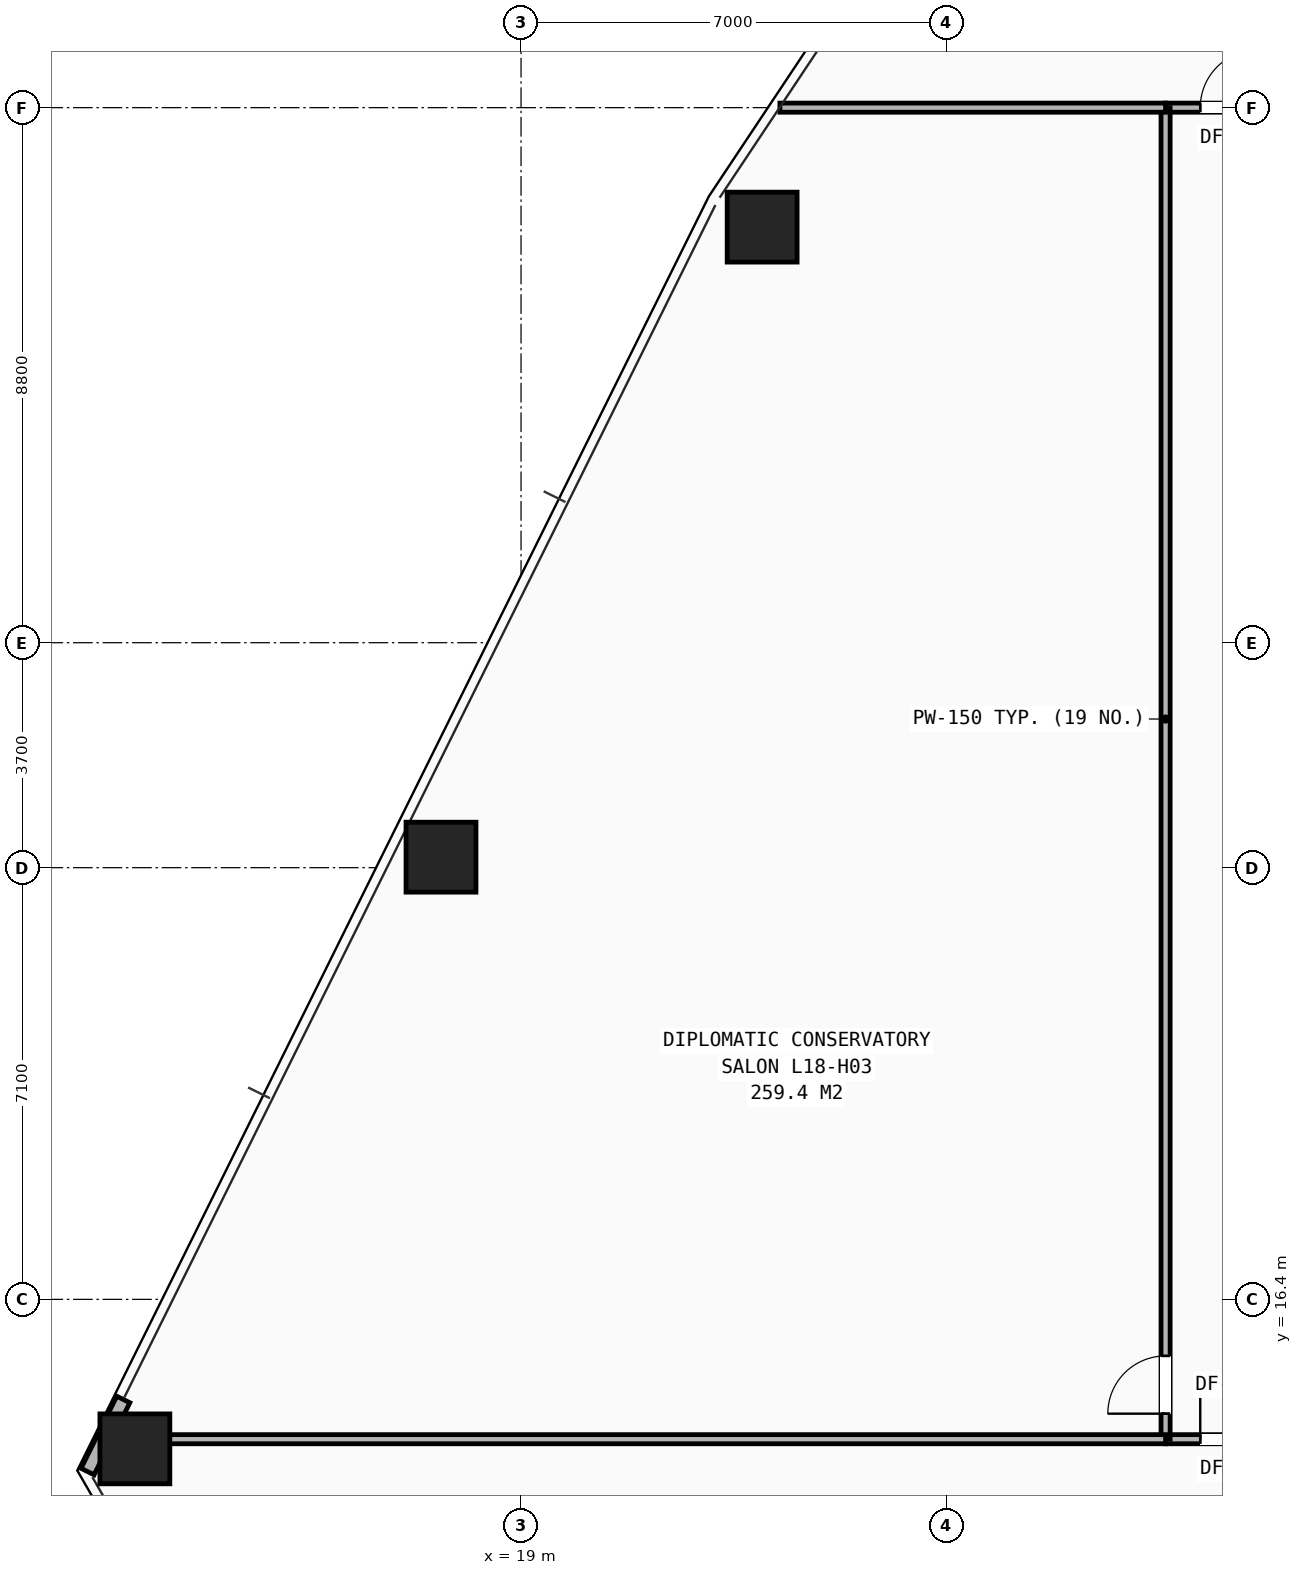
"""IFC4 building model, lengths in metres.
Left out: names, types, materials, properties, quantities, classifications, styles, units other than length and angle.
Written with IfcOpenShell. Run it as: python <this file> out.ifc"""

import sys

from ifc_helpers import new_model, si_unit, direction, frame, frame_2d, origin, origin_2d, place, context, subcontext, project, spatial, rectangle, hollow_rectangle, extrude, element, fill, save


model = new_model("IFC4")
c1 = context("Model", 3, precision=1e-05, world=origin(), true_north=direction((0.0, 1.0)))
c2 = subcontext(c1, "Body", "Model", "MODEL_VIEW")
j1 = project(units=[si_unit("LENGTHUNIT", "METRE"), si_unit("PLANEANGLEUNIT", "RADIAN")], contexts=[c1])
p1 = place(None, origin())
s1 = spatial("IfcSite", under=j1, at=p1, CompositionType="ELEMENT")
p2 = place(p1, origin())
s2 = spatial("IfcBuilding", under=s1, at=p2, CompositionType="ELEMENT")
p3 = place(p2, frame((0.0, 0.0, 65.6)))
s3 = spatial("IfcBuildingStorey", under=s2, at=p3, CompositionType="ELEMENT", Elevation=65.6)
for number, where, z_axis, x_axis in (
    (1, (22.965, 34.035, 0.0), (0.0, 0.0, 1.0), (1.0, 0.0, 0.0)),
    (2, (17.684, 23.673, 0.0), (0.0, 0.0, 1.0), (1.0, 0.0, 0.0)),
    (3, (12.649, 13.941, 0.0), (0.0, 0.0, 1.0), (1.0, 0.0, 0.0)),
):
    element("IfcColumn", number, at=place(p3, frame(where, z_axis=z_axis, x_axis=x_axis)), inside=s3, PredefinedType="COLUMN", context=c2, shape_type="SweptSolid", body=[
        extrude(hollow_rectangle(XDim=1.15, YDim=1.15, WallThickness=0.075, at=origin_2d()), origin(), (0.0, 0.0, 1.0), 3.2),
    ])
p4 = place(p3, frame((12.459, 14.754, 0.0), z_axis=(0.0, 0.0, 1.0), x_axis=(-0.444037765369, -0.896008070793, 0.0)))
e4 = element("IfcWall", 4, at=p4, inside=s3, PredefinedType="SHEAR", context=c2, shape_type="SweptSolid", body=[
    extrude(rectangle(XDim=1.323, YDim=0.24, at=frame_2d((0.662, 0.0))), origin(), (0.0, 0.0, 1.0), 2.183),
])
p5 = place(p3, frame((29.6, 14.1, 0.0), z_axis=(0.0, 0.0, 1.0), x_axis=(1.0, 0.0, 0.0)))
e5 = element("IfcWall", 5, at=p5, inside=s3, PredefinedType="PARTITIONING", context=c2, shape_type="SweptSolid", body=[
    extrude(rectangle(XDim=20.8, YDim=0.15, at=frame_2d((10.4, 0.0))), origin(), (0.0, 0.0, 1.0), 2.351),
])
p6 = place(p5, frame((0.57, 0.0, 0.0)))
e6 = element("IfcOpeningElement", 6, at=p6, cuts=e5, PredefinedType="OPENING", context=c2, shape_type="SweptSolid", body=[
    extrude(rectangle(XDim=0.95, YDim=2.1, at=frame_2d((0.475, 1.05))), frame((0.0, 0.085, 0.0), z_axis=(0.0, -1.0, 0.0), x_axis=(1.0, 0.0, 0.0)), (0.0, 0.0, 1.0), 0.17),
])
p7 = place(p5, frame((9.32, 0.0, 0.0)))
e7 = element("IfcOpeningElement", 7, at=p7, cuts=e5, PredefinedType="OPENING", context=c2, shape_type="SweptSolid", body=[
    extrude(rectangle(XDim=0.95, YDim=2.1, at=frame_2d((0.475, 1.05))), frame((0.0, 0.085, 0.0), z_axis=(0.0, -1.0, 0.0), x_axis=(1.0, 0.0, 0.0)), (0.0, 0.0, 1.0), 0.17),
])
p8 = place(p3, frame((29.6, 36.0, 0.0), z_axis=(0.0, 0.0, 1.0), x_axis=(1.0, 0.0, 0.0)))
e8 = element("IfcWall", 8, at=p8, inside=s3, PredefinedType="PARTITIONING", context=c2, shape_type="SweptSolid", body=[
    extrude(rectangle(XDim=9.65, YDim=0.15, at=frame_2d((4.825, 0.0))), origin(), (0.0, 0.0, 1.0), 2.9),
])
p9 = place(p8, frame((0.57, 0.0, 0.0)))
e9 = element("IfcOpeningElement", 9, at=p9, cuts=e8, PredefinedType="OPENING", context=c2, shape_type="SweptSolid", body=[
    extrude(rectangle(XDim=0.95, YDim=2.1, at=frame_2d((0.475, 1.05))), frame((0.0, 0.085, 0.0), z_axis=(0.0, -1.0, 0.0), x_axis=(1.0, 0.0, 0.0)), (0.0, 0.0, 1.0), 0.17),
])
p10 = place(p3, frame((29.6, 14.1, 0.0), z_axis=(0.0, 0.0, 1.0), x_axis=(0.0, 1.0, 0.0)))
e10 = element("IfcWall", 10, at=p10, inside=s3, PredefinedType="PARTITIONING", context=c2, shape_type="SweptSolid", body=[
    extrude(rectangle(XDim=21.9, YDim=0.15, at=frame_2d((10.95, 0.0))), origin(), (0.0, 0.0, 1.0), 2.351),
])
p11 = place(p10, frame((0.42, 0.0, 0.0)))
e11 = element("IfcOpeningElement", 11, at=p11, cuts=e10, PredefinedType="OPENING", context=c2, shape_type="SweptSolid", body=[
    extrude(rectangle(XDim=0.95, YDim=2.1, at=frame_2d((0.475, 1.05))), frame((0.0, 0.085, 0.0), z_axis=(0.0, -1.0, 0.0), x_axis=(1.0, 0.0, 0.0)), (0.0, 0.0, 1.0), 0.17),
])
p12 = place(p3, frame((12.141, 14.1, 0.0), z_axis=(0.0, 0.0, 1.0), x_axis=(1.0, 0.0, 0.0)))
e12 = element("IfcWall", 12, at=p12, inside=s3, PredefinedType="PARTITIONING", context=c2, shape_type="SweptSolid", body=[
    extrude(rectangle(XDim=17.459, YDim=0.15, at=frame_2d((8.73, 0.0))), origin(), (0.0, 0.0, 1.0), 2.188),
])
p13 = place(p3, frame((23.257, 36.0, 0.0), z_axis=(0.0, 0.0, 1.0), x_axis=(1.0, 0.0, 0.0)))
e13 = element("IfcWall", 13, at=p13, inside=s3, PredefinedType="PARTITIONING", context=c2, shape_type="SweptSolid", body=[
    extrude(rectangle(XDim=6.343, YDim=0.15, at=frame_2d((3.171, 0.0))), origin(), (0.0, 0.0, 1.0), 2.188),
])
p14 = place(p6, origin())
e14 = element("IfcDoor", 14, at=p14, inside=s3, OperationType="SINGLE_SWING_LEFT", PredefinedType="DOOR", context=c2, shape_type="SweptSolid", body=[
    extrude(rectangle(XDim=0.95, YDim=2.1, at=frame_2d((0.475, 1.05))), frame((0.0, 0.025, 0.0), z_axis=(0.0, -1.0, 0.0), x_axis=(1.0, 0.0, 0.0)), (0.0, 0.0, 1.0), 0.05),
])
fill(e6, e14)
p15 = place(p11, origin())
e15 = element("IfcDoor", 15, at=p15, inside=s3, OperationType="SINGLE_SWING_LEFT", PredefinedType="DOOR", context=c2, shape_type="SweptSolid", body=[
    extrude(rectangle(XDim=0.95, YDim=2.1, at=frame_2d((0.475, 1.05))), frame((0.0, 0.025, 0.0), z_axis=(0.0, -1.0, 0.0), x_axis=(1.0, 0.0, 0.0)), (0.0, 0.0, 1.0), 0.05),
])
fill(e11, e15)
p16 = place(p9, origin())
e16 = element("IfcDoor", 16, at=p16, inside=s3, OperationType="SINGLE_SWING_RIGHT", PredefinedType="DOOR", context=c2, shape_type="SweptSolid", body=[
    extrude(rectangle(XDim=0.95, YDim=2.1, at=frame_2d((0.475, 1.05))), frame((0.0, 0.025, 0.0), z_axis=(0.0, -1.0, 0.0), x_axis=(1.0, 0.0, 0.0)), (0.0, 0.0, 1.0), 0.05),
])
fill(e9, e16)
save(model, sys.argv[1])
